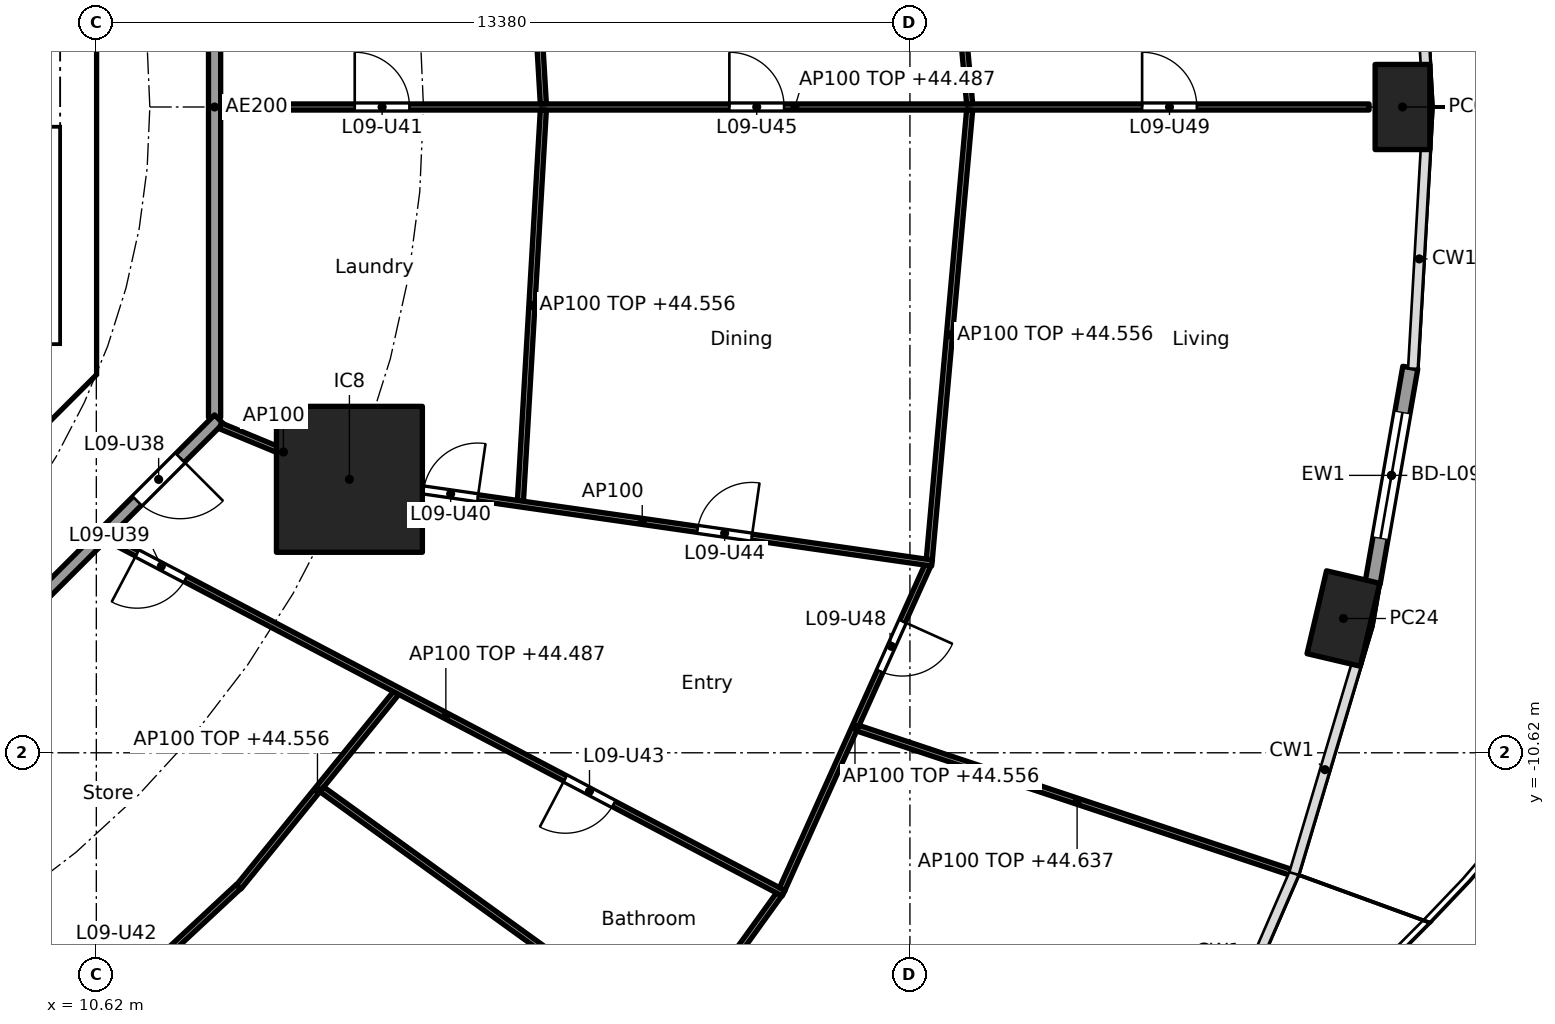
"""IFC4 building model, lengths in metres.
Left out: names, types, materials, properties, quantities, classifications, styles, units other than length and angle.
Written with IfcOpenShell. Run it as: python <this file> out.ifc"""

import sys

from ifc_helpers import new_model, si_unit, direction, frame, frame_2d, origin, origin_2d, place, context, subcontext, project, spatial, polyline, rectangle, hollow_rectangle, outline, extrude, element, fill, save


model = new_model("IFC4")
c1 = context("Model", 3, precision=1e-05, world=origin(), true_north=direction((0.0, 1.0)))
c2 = subcontext(c1, "Body", "Model", "MODEL_VIEW")
j1 = project(units=[si_unit("LENGTHUNIT", "METRE"), si_unit("PLANEANGLEUNIT", "RADIAN")], contexts=[c1])
p1 = place(None, origin())
s1 = spatial("IfcSite", under=j1, at=p1, CompositionType="ELEMENT")
p2 = place(p1, origin())
s2 = spatial("IfcBuilding", under=s1, at=p2, CompositionType="ELEMENT")
p3 = place(p2, frame((0.0, 0.0, 41.8)))
s3 = spatial("IfcBuildingStorey", under=s2, at=p3, CompositionType="ELEMENT", Elevation=41.8)
for number, where, z_axis, x_axis in (
    (1, (32.1, 0.0, 0.0), (0.0, 0.0, 1.0), (0.0, 1.0, 0.0)),
    (2, (31.129, -8.412, 0.0), (0.0, 0.0, 1.0), (0.229, 0.973, 0.0)),
):
    element("IfcColumn", number, at=place(p3, frame(where, z_axis=z_axis, x_axis=x_axis)), inside=s3, PredefinedType="COLUMN", context=c2, shape_type="SweptSolid", body=[
        extrude(hollow_rectangle(XDim=1.4, YDim=0.9, WallThickness=0.05, at=origin_2d()), origin(), (0.0, 0.0, 1.0), 3.7),
    ])
p4 = place(p3, frame((14.782, -6.123, 0.0), z_axis=(0.0, 0.0, 1.0), x_axis=(1.0, 0.0, 0.0)))
e3 = element("IfcColumn", 3, at=p4, inside=s3, PredefinedType="COLUMN", context=c2, shape_type="SweptSolid", body=[
    extrude(rectangle(XDim=2.4, YDim=2.4, at=origin_2d()), origin(), (0.0, 0.0, 1.0), 3.7),
])
p5 = place(p3, frame((32.229, -4.286, 0.0), z_axis=(0.0, 0.0, 1.0), x_axis=(-0.172217377323, -0.98505897029, 0.0)))
e4 = element("IfcWall", 4, at=p5, inside=s3, PredefinedType="SOLIDWALL", context=c2, shape_type="SweptSolid", body=[
    extrude(rectangle(XDim=3.598, YDim=0.25, at=frame_2d((1.799, 0.0))), origin(), (0.0, 0.0, 1.0), 3.44),
])
p6 = place(p5, frame((0.749, 0.0, 0.0)))
e5 = element("IfcOpeningElement", 5, at=p6, cuts=e4, PredefinedType="OPENING", context=c2, shape_type="SweptSolid", body=[
    extrude(rectangle(XDim=2.1, YDim=2.4, at=frame_2d((1.05, 1.2))), frame((0.0, 0.135, 0.0), z_axis=(0.0, -1.0, 0.0), x_axis=(1.0, 0.0, 0.0)), (0.0, 0.0, 1.0), 0.27),
])
p7 = place(p3, frame((4.613, -9.988, 0.0), z_axis=(0.0, 0.0, 1.0), x_axis=(0.707106781187, 0.707106781187, 0.0)))
e6 = element("IfcWall", 6, at=p7, inside=s3, PredefinedType="SHEAR", context=c2, shape_type="SweptSolid", body=[
    extrude(rectangle(XDim=7.602, YDim=0.6, at=frame_2d((3.801, 0.0))), origin(), (0.0, 0.0, 1.0), 3.44),
])
p8 = place(p7, frame((3.201, 0.0, 0.0)))
e7 = element("IfcOpeningElement", 7, at=p8, cuts=e6, PredefinedType="OPENING", context=c2, shape_type="SweptSolid", body=[
    extrude(rectangle(XDim=1.2, YDim=2.1, at=frame_2d((0.6, 1.05))), frame((0.0, 0.31, 0.0), z_axis=(0.0, -1.0, 0.0), x_axis=(1.0, 0.0, 0.0)), (0.0, 0.0, 1.0), 0.62),
])
p9 = place(p3, origin())
e8 = element("IfcWall", 8, at=p9, inside=s3, PredefinedType="SHEAR", context=c2, shape_type="SweptSolid", body=[
    extrude(outline(polyline([(9.776, -4.401), (10.025, -4.152), (10.025, -3.801), (10.025, 4.152), (9.776, 4.401), (10.2, 4.825), (10.625, 4.401), (10.625, -4.401), (10.2, -4.825), (9.776, -4.401)])), origin(), (0.0, 0.0, 1.0), 3.44),
])
p10 = place(p3, origin())
e9 = element("IfcWall", 9, at=p10, inside=s3, PredefinedType="SOLIDWALL", context=c2, shape_type="SweptSolid", body=[
    extrude(outline(polyline([(10.025, -4.1), (6.7, -4.1), (6.7, -3.9), (10.025, -3.9), (10.025, -4.1)])), origin(), (0.0, 0.0, 1.0), 3.44),
])
p11 = place(p3, frame((12.565, -5.104, 0.0), z_axis=(0.0, 0.0, 1.0), x_axis=(0.0, 1.0, 0.0)))
e10 = element("IfcWall", 10, at=p11, inside=s3, PredefinedType="PARTITIONING", context=c2, shape_type="SweptSolid", body=[
    extrude(rectangle(XDim=10.209, YDim=0.2, at=frame_2d((5.104, 0.0))), origin(), (0.0, 0.0, 1.0), 3.44),
])
p12 = place(p3, frame((5.275, -12.494, 0.0), z_axis=(0.0, 0.0, 1.0), x_axis=(0.707106781187, 0.707106781187, 0.0)))
e11 = element("IfcWall", 11, at=p12, inside=s3, PredefinedType="PARTITIONING", context=c2, shape_type="SweptSolid", body=[
    extrude(rectangle(XDim=10.409, YDim=0.2, at=frame_2d((5.205, 0.0))), origin(), (0.0, 0.0, 1.0), 3.44),
])
p13 = place(p12, frame((8.508, 0.0, 0.0)))
e12 = element("IfcOpeningElement", 12, at=p13, cuts=e11, PredefinedType="OPENING", context=c2, shape_type="SweptSolid", body=[
    extrude(rectangle(XDim=1.0, YDim=2.1, at=frame_2d((0.5, 1.05))), frame((0.0, 0.11, 0.0), z_axis=(0.0, -1.0, 0.0), x_axis=(1.0, 0.0, 0.0)), (0.0, 0.0, 1.0), 0.22),
])
p14 = place(p3, frame((12.665, 0.0, 0.0), z_axis=(0.0, 0.0, 1.0), x_axis=(1.0, 0.0, 0.0)))
e13 = element("IfcWall", 13, at=p14, inside=s3, PredefinedType="PARTITIONING", context=c2, shape_type="SweptSolid", body=[
    extrude(rectangle(XDim=18.885, YDim=0.1, at=frame_2d((9.443, 0.0))), origin(), (0.0, 0.0, 1.0), 2.687),
])
p15 = place(p14, frame((2.205, 0.0, 0.0)))
e14 = element("IfcOpeningElement", 14, at=p15, cuts=e13, PredefinedType="OPENING", context=c2, shape_type="SweptSolid", body=[
    extrude(rectangle(XDim=0.9, YDim=2.1, at=frame_2d((0.45, 1.05))), frame((0.0, 0.06, 0.0), z_axis=(0.0, -1.0, 0.0), x_axis=(1.0, 0.0, 0.0)), (0.0, 0.0, 1.0), 0.12),
])
p16 = place(p14, frame((8.366, 0.0, 0.0)))
e15 = element("IfcOpeningElement", 15, at=p16, cuts=e13, PredefinedType="OPENING", context=c2, shape_type="SweptSolid", body=[
    extrude(rectangle(XDim=0.9, YDim=2.1, at=frame_2d((0.45, 1.05))), frame((0.0, 0.06, 0.0), z_axis=(0.0, -1.0, 0.0), x_axis=(1.0, 0.0, 0.0)), (0.0, 0.0, 1.0), 0.12),
])
p17 = place(p14, frame((15.154, 0.0, 0.0)))
e16 = element("IfcOpeningElement", 16, at=p17, cuts=e13, PredefinedType="OPENING", context=c2, shape_type="SweptSolid", body=[
    extrude(rectangle(XDim=0.9, YDim=2.1, at=frame_2d((0.45, 1.05))), frame((0.0, 0.06, 0.0), z_axis=(0.0, -1.0, 0.0), x_axis=(1.0, 0.0, 0.0)), (0.0, 0.0, 1.0), 0.12),
])
p18 = place(p3, frame((17.971, 0.05, 0.0), z_axis=(0.0, 0.0, 1.0), x_axis=(-0.058513659907, 0.998286607946, 0.0)))
e17 = element("IfcWall", 17, at=p18, inside=s3, PredefinedType="PARTITIONING", context=c2, shape_type="SweptSolid", body=[
    extrude(rectangle(XDim=6.388, YDim=0.1, at=frame_2d((3.194, 0.0))), origin(), (0.0, 0.0, 1.0), 2.756),
])
p19 = place(p3, frame((17.971, -0.05, 0.0), z_axis=(0.0, 0.0, 1.0), x_axis=(-0.058475267553, -0.998288857538, 0.0)))
e18 = element("IfcWall", 18, at=p19, inside=s3, PredefinedType="PARTITIONING", context=c2, shape_type="SweptSolid", body=[
    extrude(rectangle(XDim=6.438, YDim=0.1, at=frame_2d((3.219, 0.0))), origin(), (0.0, 0.0, 1.0), 2.756),
])
p20 = place(p3, frame((24.982, 0.05, 0.0), z_axis=(0.0, 0.0, 1.0), x_axis=(-0.08944290521, 0.995991951126, 0.0)))
e19 = element("IfcWall", 19, at=p20, inside=s3, PredefinedType="PARTITIONING", context=c2, shape_type="SweptSolid", body=[
    extrude(rectangle(XDim=7.373, YDim=0.1, at=frame_2d((3.686, 0.0))), origin(), (0.0, 0.0, 1.0), 2.756),
])
p21 = place(p3, frame((24.982, -0.05, 0.0), z_axis=(0.0, 0.0, 1.0), x_axis=(-0.089432471274, -0.995992888068, 0.0)))
e20 = element("IfcWall", 20, at=p21, inside=s3, PredefinedType="PARTITIONING", context=c2, shape_type="SweptSolid", body=[
    extrude(rectangle(XDim=7.423, YDim=0.1, at=frame_2d((3.711, 0.0))), origin(), (0.0, 0.0, 1.0), 2.756),
])
p22 = place(p3, frame((7.097, -10.81, 0.0), z_axis=(0.0, 0.0, 1.0), x_axis=(0.526453266471, -0.850204068576, 0.0)))
e21 = element("IfcWall", 21, at=p22, inside=s3, PredefinedType="PARTITIONING", context=c2, shape_type="SweptSolid", body=[
    extrude(rectangle(XDim=19.85, YDim=0.1, at=frame_2d((9.925, 0.0))), origin(), (0.0, 0.0, 1.0), 2.687),
])
p23 = place(p22, frame((0.35, 0.0, 0.0)))
e22 = element("IfcOpeningElement", 22, at=p23, cuts=e21, PredefinedType="OPENING", context=c2, shape_type="SweptSolid", body=[
    extrude(rectangle(XDim=0.9, YDim=2.1, at=frame_2d((0.45, 1.05))), frame((0.0, 0.06, 0.0), z_axis=(0.0, -1.0, 0.0), x_axis=(1.0, 0.0, 0.0)), (0.0, 0.0, 1.0), 0.12),
])
p24 = place(p22, frame((8.795, 0.0, 0.0)))
e23 = element("IfcOpeningElement", 23, at=p24, cuts=e21, PredefinedType="OPENING", context=c2, shape_type="SweptSolid", body=[
    extrude(rectangle(XDim=0.9, YDim=2.1, at=frame_2d((0.45, 1.05))), frame((0.0, 0.06, 0.0), z_axis=(0.0, -1.0, 0.0), x_axis=(1.0, 0.0, 0.0)), (0.0, 0.0, 1.0), 0.12),
])
p25 = place(p22, frame((15.935, 0.0, 0.0)))
e24 = element("IfcOpeningElement", 24, at=p25, cuts=e21, PredefinedType="OPENING", context=c2, shape_type="SweptSolid", body=[
    extrude(rectangle(XDim=0.9, YDim=2.1, at=frame_2d((0.45, 1.05))), frame((0.0, 0.06, 0.0), z_axis=(0.0, -1.0, 0.0), x_axis=(1.0, 0.0, 0.0)), (0.0, 0.0, 1.0), 0.12),
])
p26 = place(p3, frame((10.066, -15.511, 0.0), z_axis=(0.0, 0.0, 1.0), x_axis=(0.732022571638, 0.681280378855, 0.0)))
e25 = element("IfcWall", 25, at=p26, inside=s3, PredefinedType="PARTITIONING", context=c2, shape_type="SweptSolid", body=[
    extrude(rectangle(XDim=3.95, YDim=0.1, at=frame_2d((1.975, 0.0))), origin(), (0.0, 0.0, 1.0), 3.44),
])
p27 = place(p26, frame((1.525, 0.0, 0.0)))
e26 = element("IfcOpeningElement", 26, at=p27, cuts=e25, PredefinedType="OPENING", context=c2, shape_type="SweptSolid", body=[
    extrude(rectangle(XDim=0.9, YDim=2.1, at=frame_2d((0.45, 1.05))), frame((0.0, 0.06, 0.0), z_axis=(0.0, -1.0, 0.0), x_axis=(1.0, 0.0, 0.0)), (0.0, 0.0, 1.0), 0.12),
])
p28 = place(p3, frame((12.963, -12.825, 0.0), z_axis=(0.0, 0.0, 1.0), x_axis=(0.63012473344, 0.776493928056, 0.0)))
e27 = element("IfcWall", 27, at=p28, inside=s3, PredefinedType="PARTITIONING", context=c2, shape_type="SweptSolid", body=[
    extrude(rectangle(XDim=4.106, YDim=0.1, at=frame_2d((2.053, 0.0))), origin(), (0.0, 0.0, 1.0), 2.756),
])
p29 = place(p3, frame((18.293, -17.884, 0.0), z_axis=(0.0, 0.0, 1.0), x_axis=(0.584558392935, 0.811351640936, 0.0)))
e28 = element("IfcWall", 28, at=p29, inside=s3, PredefinedType="PARTITIONING", context=c2, shape_type="SweptSolid", body=[
    extrude(rectangle(XDim=6.084, YDim=0.1, at=frame_2d((3.042, 0.0))), origin(), (0.0, 0.0, 1.0), 2.756),
])
p30 = place(p3, frame((14.329, -11.221, 0.0), z_axis=(0.0, 0.0, 1.0), x_axis=(0.810671130917, -0.58550176558, 0.0)))
e29 = element("IfcWall", 29, at=p30, inside=s3, PredefinedType="PARTITIONING", context=c2, shape_type="SweptSolid", body=[
    extrude(rectangle(XDim=15.106, YDim=0.1, at=frame_2d((7.553, 0.0))), origin(), (0.0, 0.0, 1.0), 2.837),
])
p31 = place(p30, frame((10.659, 0.0, 0.0)))
e30 = element("IfcOpeningElement", 30, at=p31, cuts=e29, PredefinedType="OPENING", context=c2, shape_type="SweptSolid", body=[
    extrude(rectangle(XDim=0.9, YDim=2.1, at=frame_2d((0.45, 1.05))), frame((0.0, 0.06, 0.0), z_axis=(0.0, -1.0, 0.0), x_axis=(1.0, 0.0, 0.0)), (0.0, 0.0, 1.0), 0.12),
])
p32 = place(p3, frame((10.813, -7.091, 0.0), z_axis=(0.0, 0.0, 1.0), x_axis=(0.885182649479, -0.465243674928, 0.0)))
e31 = element("IfcWall", 31, at=p32, inside=s3, PredefinedType="PARTITIONING", context=c2, shape_type="SweptSolid", body=[
    extrude(rectangle(XDim=12.551, YDim=0.1, at=frame_2d((6.275, 0.0))), origin(), (0.0, 0.0, 1.0), 2.687),
])
p33 = place(p32, frame((0.539, 0.0, 0.0)))
e32 = element("IfcOpeningElement", 32, at=p33, cuts=e31, PredefinedType="OPENING", context=c2, shape_type="SweptSolid", body=[
    extrude(rectangle(XDim=0.9, YDim=2.1, at=frame_2d((0.45, 1.05))), frame((0.0, 0.06, 0.0), z_axis=(0.0, -1.0, 0.0), x_axis=(1.0, 0.0, 0.0)), (0.0, 0.0, 1.0), 0.12),
])
p34 = place(p32, frame((8.494, 0.0, 0.0)))
e33 = element("IfcOpeningElement", 33, at=p34, cuts=e31, PredefinedType="OPENING", context=c2, shape_type="SweptSolid", body=[
    extrude(rectangle(XDim=0.9, YDim=2.1, at=frame_2d((0.45, 1.05))), frame((0.0, 0.06, 0.0), z_axis=(0.0, -1.0, 0.0), x_axis=(1.0, 0.0, 0.0)), (0.0, 0.0, 1.0), 0.12),
])
p35 = place(p3, frame((21.899, -12.861, 0.0), z_axis=(0.0, 0.0, 1.0), x_axis=(0.410197710154, 0.911996622025, 0.0)))
e34 = element("IfcWall", 34, at=p35, inside=s3, PredefinedType="PARTITIONING", context=c2, shape_type="SweptSolid", body=[
    extrude(rectangle(XDim=5.837, YDim=0.1, at=frame_2d((2.918, 0.0))), origin(), (0.0, 0.0, 1.0), 2.756),
])
p36 = place(p35, frame((3.928, 0.0, 0.0)))
e35 = element("IfcOpeningElement", 35, at=p36, cuts=e34, PredefinedType="OPENING", context=c2, shape_type="SweptSolid", body=[
    extrude(rectangle(XDim=0.9, YDim=2.1, at=frame_2d((0.45, 1.05))), frame((0.0, 0.06, 0.0), z_axis=(0.0, -1.0, 0.0), x_axis=(1.0, 0.0, 0.0)), (0.0, 0.0, 1.0), 0.12),
])
p37 = place(p3, frame((23.144, -10.216, 0.0), z_axis=(0.0, 0.0, 1.0), x_axis=(0.948811715359, -0.315842253027, 0.0)))
e36 = element("IfcWall", 36, at=p37, inside=s3, PredefinedType="PARTITIONING", context=c2, shape_type="SweptSolid", body=[
    extrude(rectangle(XDim=7.6, YDim=0.1, at=frame_2d((3.8, 0.0))), origin(), (0.0, 0.0, 1.0), 2.837),
])
p38 = place(p3, frame((12.657, -5.243, 0.0), z_axis=(0.0, 0.0, 1.0), x_axis=(0.923864733477, -0.382719158442, 0.0)))
e37 = element("IfcWall", 37, at=p38, inside=s3, PredefinedType="PARTITIONING", context=c2, shape_type="SweptSolid", body=[
    extrude(rectangle(XDim=2.25, YDim=0.1, at=frame_2d((1.125, 0.0))), origin(), (0.0, 0.0, 1.0), 3.44),
])
p39 = place(p3, frame((14.832, -6.13, 0.0), z_axis=(0.0, 0.0, 1.0), x_axis=(0.989837122016, -0.142205737856, 0.0)))
e38 = element("IfcWall", 38, at=p39, inside=s3, PredefinedType="PARTITIONING", context=c2, shape_type="SweptSolid", body=[
    extrude(rectangle(XDim=9.63, YDim=0.1, at=frame_2d((4.815, 0.0))), origin(), (0.0, 0.0, 1.0), 3.44),
])
p40 = place(p39, frame((1.182, 0.0, 0.0)))
e39 = element("IfcOpeningElement", 39, at=p40, cuts=e38, PredefinedType="OPENING", context=c2, shape_type="SweptSolid", body=[
    extrude(rectangle(XDim=0.9, YDim=2.1, at=frame_2d((0.45, 1.05))), frame((0.0, 0.06, 0.0), z_axis=(0.0, -1.0, 0.0), x_axis=(1.0, 0.0, 0.0)), (0.0, 0.0, 1.0), 0.12),
])
p41 = place(p39, frame((5.734, 0.0, 0.0)))
e40 = element("IfcOpeningElement", 40, at=p41, cuts=e38, PredefinedType="OPENING", context=c2, shape_type="SweptSolid", body=[
    extrude(rectangle(XDim=0.9, YDim=2.1, at=frame_2d((0.45, 1.05))), frame((0.0, 0.06, 0.0), z_axis=(0.0, -1.0, 0.0), x_axis=(1.0, 0.0, 0.0)), (0.0, 0.0, 1.0), 0.12),
])
p42 = place(p6, origin())
e41 = element("IfcDoor", 41, at=p42, inside=s3, OperationType="SLIDING_TO_LEFT", PredefinedType="DOOR", context=c2, shape_type="SweptSolid", body=[
    extrude(rectangle(XDim=2.1, YDim=2.4, at=frame_2d((1.05, 1.2))), frame((0.0, 0.025, 0.0), z_axis=(0.0, -1.0, 0.0), x_axis=(1.0, 0.0, 0.0)), (0.0, 0.0, 1.0), 0.05),
])
fill(e5, e41)
p43 = place(p13, frame((1.0, 0.0, 0.0), x_axis=(-1.0, 0.0, 0.0)))
e42 = element("IfcDoor", 42, at=p43, inside=s3, OperationType="SINGLE_SWING_LEFT", PredefinedType="DOOR", context=c2, shape_type="SweptSolid", body=[
    extrude(rectangle(XDim=1.0, YDim=2.1, at=frame_2d((0.5, 1.05))), frame((0.0, 0.025, 0.0), z_axis=(0.0, -1.0, 0.0), x_axis=(1.0, 0.0, 0.0)), (0.0, 0.0, 1.0), 0.05),
])
fill(e12, e42)
p44 = place(p33, frame((0.9, 0.0, 0.0), x_axis=(-1.0, 0.0, 0.0)))
e43 = element("IfcDoor", 43, at=p44, inside=s3, OperationType="SINGLE_SWING_RIGHT", PredefinedType="DOOR", context=c2, shape_type="SweptSolid", body=[
    extrude(rectangle(XDim=0.9, YDim=2.1, at=frame_2d((0.45, 1.05))), frame((0.0, 0.025, 0.0), z_axis=(0.0, -1.0, 0.0), x_axis=(1.0, 0.0, 0.0)), (0.0, 0.0, 1.0), 0.05),
])
fill(e32, e43)
p45 = place(p40, origin())
e44 = element("IfcDoor", 44, at=p45, inside=s3, OperationType="SINGLE_SWING_RIGHT", PredefinedType="DOOR", context=c2, shape_type="SweptSolid", body=[
    extrude(rectangle(XDim=0.9, YDim=2.1, at=frame_2d((0.45, 1.05))), frame((0.0, 0.025, 0.0), z_axis=(0.0, -1.0, 0.0), x_axis=(1.0, 0.0, 0.0)), (0.0, 0.0, 1.0), 0.05),
])
fill(e39, e44)
p46 = place(p15, origin())
e45 = element("IfcDoor", 45, at=p46, inside=s3, OperationType="SINGLE_SWING_LEFT", PredefinedType="DOOR", context=c2, shape_type="SweptSolid", body=[
    extrude(rectangle(XDim=0.9, YDim=2.1, at=frame_2d((0.45, 1.05))), frame((0.0, 0.025, 0.0), z_axis=(0.0, -1.0, 0.0), x_axis=(1.0, 0.0, 0.0)), (0.0, 0.0, 1.0), 0.05),
])
fill(e14, e45)
p47 = place(p34, frame((0.9, 0.0, 0.0), x_axis=(-1.0, 0.0, 0.0)))
e46 = element("IfcDoor", 46, at=p47, inside=s3, OperationType="SINGLE_SWING_RIGHT", PredefinedType="DOOR", context=c2, shape_type="SweptSolid", body=[
    extrude(rectangle(XDim=0.9, YDim=2.1, at=frame_2d((0.45, 1.05))), frame((0.0, 0.025, 0.0), z_axis=(0.0, -1.0, 0.0), x_axis=(1.0, 0.0, 0.0)), (0.0, 0.0, 1.0), 0.05),
])
fill(e33, e46)
p48 = place(p41, origin())
e47 = element("IfcDoor", 47, at=p48, inside=s3, OperationType="SINGLE_SWING_RIGHT", PredefinedType="DOOR", context=c2, shape_type="SweptSolid", body=[
    extrude(rectangle(XDim=0.9, YDim=2.1, at=frame_2d((0.45, 1.05))), frame((0.0, 0.025, 0.0), z_axis=(0.0, -1.0, 0.0), x_axis=(1.0, 0.0, 0.0)), (0.0, 0.0, 1.0), 0.05),
])
fill(e40, e47)
p49 = place(p16, origin())
e48 = element("IfcDoor", 48, at=p49, inside=s3, OperationType="SINGLE_SWING_LEFT", PredefinedType="DOOR", context=c2, shape_type="SweptSolid", body=[
    extrude(rectangle(XDim=0.9, YDim=2.1, at=frame_2d((0.45, 1.05))), frame((0.0, 0.025, 0.0), z_axis=(0.0, -1.0, 0.0), x_axis=(1.0, 0.0, 0.0)), (0.0, 0.0, 1.0), 0.05),
])
fill(e15, e48)
p50 = place(p36, frame((0.9, 0.0, 0.0), x_axis=(-1.0, 0.0, 0.0)))
e49 = element("IfcDoor", 49, at=p50, inside=s3, OperationType="SINGLE_SWING_LEFT", PredefinedType="DOOR", context=c2, shape_type="SweptSolid", body=[
    extrude(rectangle(XDim=0.9, YDim=2.1, at=frame_2d((0.45, 1.05))), frame((0.0, 0.025, 0.0), z_axis=(0.0, -1.0, 0.0), x_axis=(1.0, 0.0, 0.0)), (0.0, 0.0, 1.0), 0.05),
])
fill(e35, e49)
p51 = place(p17, origin())
e50 = element("IfcDoor", 50, at=p51, inside=s3, OperationType="SINGLE_SWING_LEFT", PredefinedType="DOOR", context=c2, shape_type="SweptSolid", body=[
    extrude(rectangle(XDim=0.9, YDim=2.1, at=frame_2d((0.45, 1.05))), frame((0.0, 0.025, 0.0), z_axis=(0.0, -1.0, 0.0), x_axis=(1.0, 0.0, 0.0)), (0.0, 0.0, 1.0), 0.05),
])
fill(e16, e50)
save(model, sys.argv[1])
